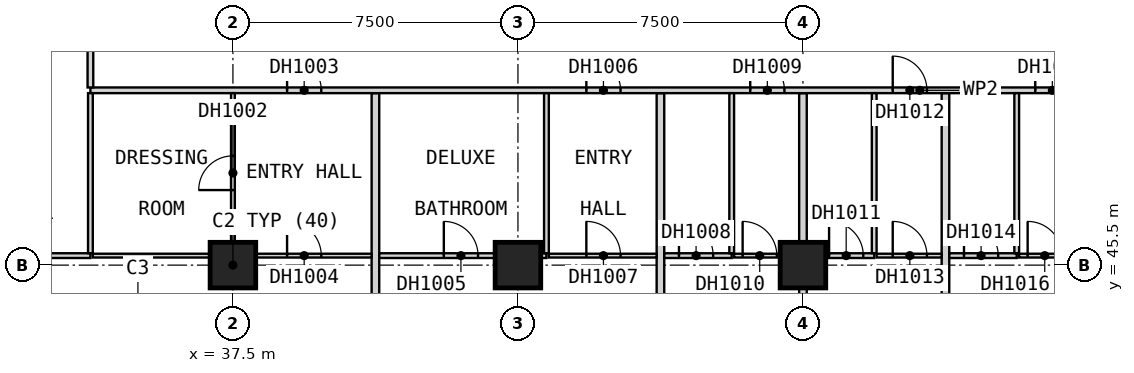
"""IFC4 building model, lengths in metres.
Left out: names, types, materials, properties, quantities, classifications, styles, units other than length and angle.
Written with IfcOpenShell. Run it as: python <this file> out.ifc"""

import sys

from ifc_helpers import new_model, si_unit, direction, frame, frame_2d, origin, origin_2d, place, context, subcontext, project, spatial, rectangle, extrude, element, fill, save


model = new_model("IFC4")
c1 = context("Model", 3, precision=1e-05, world=origin(), true_north=direction((0.0, 1.0)))
c2 = subcontext(c1, "Body", "Model", "MODEL_VIEW")
j1 = project(units=[si_unit("LENGTHUNIT", "METRE"), si_unit("PLANEANGLEUNIT", "RADIAN")], contexts=[c1])
p1 = place(None, origin())
s1 = spatial("IfcSite", under=j1, at=p1, CompositionType="ELEMENT")
p2 = place(p1, origin())
s2 = spatial("IfcBuilding", under=s1, at=p2, CompositionType="ELEMENT")
p3 = place(p2, frame((0.0, 0.0, 48.4)))
s3 = spatial("IfcBuildingStorey", under=s2, at=p3, CompositionType="ELEMENT", Elevation=48.4)
for number, where, z_axis, x_axis in (
    (1, (37.5, 45.5, 0.0), (0.0, 0.0, 1.0), (1.0, 0.0, 0.0)),
    (2, (45.0, 45.5, 0.0), (0.0, 0.0, 1.0), (1.0, 0.0, 0.0)),
    (3, (52.5, 45.5, 0.0), (0.0, 0.0, 1.0), (1.0, 0.0, 0.0)),
):
    element("IfcColumn", number, at=place(p3, frame(where, z_axis=z_axis, x_axis=x_axis)), inside=s3, PredefinedType="COLUMN", context=c2, shape_type="SweptSolid", body=[
        extrude(rectangle(XDim=1.2, YDim=1.2, at=origin_2d()), origin(), (0.0, 0.0, 1.0), 3.6),
    ])
for number, where, z_axis, x_axis in (
    (4, (41.25, 38.31, 0.0), (0.0, 0.0, 1.0), (0.0, 1.0, 0.0)),
    (5, (48.75, 38.31, 0.0), (0.0, 0.0, 1.0), (0.0, 1.0, 0.0)),
):
    element("IfcWall", number, at=place(p3, frame(where, z_axis=z_axis, x_axis=x_axis)), inside=s3, PredefinedType="PARTITIONING", context=c2, shape_type="SweptSolid", body=[
        extrude(rectangle(XDim=11.715, YDim=0.2, at=frame_2d((5.857, 0.0))), origin(), (0.0, 0.0, 1.0), 3.35),
    ])
p4 = place(p3, frame((52.5, 37.5, 0.0), z_axis=(0.0, 0.0, 1.0), x_axis=(0.0, 1.0, 0.0)))
e6 = element("IfcWall", 6, at=p4, inside=s3, PredefinedType="PARTITIONING", context=c2, shape_type="SweptSolid", body=[
    extrude(rectangle(XDim=12.525, YDim=0.2, at=frame_2d((6.262, 0.0))), origin(), (0.0, 0.0, 1.0), 3.35),
])
p5 = place(p3, frame((56.25, 38.31, 0.0), z_axis=(0.0, 0.0, 1.0), x_axis=(0.0, 1.0, 0.0)))
e7 = element("IfcWall", 7, at=p5, inside=s3, PredefinedType="PARTITIONING", context=c2, shape_type="SweptSolid", body=[
    extrude(rectangle(XDim=11.715, YDim=0.2, at=frame_2d((5.857, 0.0))), origin(), (0.0, 0.0, 1.0), 3.35),
])
p6 = place(p3, frame((33.75, 50.1, 0.0), z_axis=(0.0, 0.0, 1.0), x_axis=(1.0, 0.0, 0.0)))
e8 = element("IfcWall", 8, at=p6, inside=s3, PredefinedType="PARTITIONING", context=c2, shape_type="SweptSolid", body=[
    extrude(rectangle(XDim=43.65, YDim=0.15, at=frame_2d((21.825, 0.0))), origin(), (0.0, 0.0, 1.0), 3.35),
])
p7 = place(p6, frame((5.175, 0.0, 0.0)))
e9 = element("IfcOpeningElement", 9, at=p7, cuts=e8, PredefinedType="OPENING", context=c2, shape_type="SweptSolid", body=[
    extrude(rectangle(XDim=0.9, YDim=2.1, at=frame_2d((0.45, 1.05))), frame((0.0, 0.085, 0.0), z_axis=(0.0, -1.0, 0.0), x_axis=(1.0, 0.0, 0.0)), (0.0, 0.0, 1.0), 0.17),
])
p8 = place(p6, frame((13.05, 0.0, 0.0)))
e10 = element("IfcOpeningElement", 10, at=p8, cuts=e8, PredefinedType="OPENING", context=c2, shape_type="SweptSolid", body=[
    extrude(rectangle(XDim=0.9, YDim=2.1, at=frame_2d((0.45, 1.05))), frame((0.0, 0.085, 0.0), z_axis=(0.0, -1.0, 0.0), x_axis=(1.0, 0.0, 0.0)), (0.0, 0.0, 1.0), 0.17),
])
p9 = place(p6, frame((17.363, 0.0, 0.0)))
e11 = element("IfcOpeningElement", 11, at=p9, cuts=e8, PredefinedType="OPENING", context=c2, shape_type="SweptSolid", body=[
    extrude(rectangle(XDim=0.9, YDim=2.1, at=frame_2d((0.45, 1.05))), frame((0.0, 0.085, 0.0), z_axis=(0.0, -1.0, 0.0), x_axis=(1.0, 0.0, 0.0)), (0.0, 0.0, 1.0), 0.17),
])
p10 = place(p6, frame((21.113, 0.0, 0.0)))
e12 = element("IfcOpeningElement", 12, at=p10, cuts=e8, PredefinedType="OPENING", context=c2, shape_type="SweptSolid", body=[
    extrude(rectangle(XDim=0.9, YDim=2.1, at=frame_2d((0.45, 1.05))), frame((0.0, 0.085, 0.0), z_axis=(0.0, -1.0, 0.0), x_axis=(1.0, 0.0, 0.0)), (0.0, 0.0, 1.0), 0.17),
])
p11 = place(p6, frame((24.863, 0.0, 0.0)))
e13 = element("IfcOpeningElement", 13, at=p11, cuts=e8, PredefinedType="OPENING", context=c2, shape_type="SweptSolid", body=[
    extrude(rectangle(XDim=0.9, YDim=2.1, at=frame_2d((0.45, 1.05))), frame((0.0, 0.085, 0.0), z_axis=(0.0, -1.0, 0.0), x_axis=(1.0, 0.0, 0.0)), (0.0, 0.0, 1.0), 0.17),
])
p12 = place(p6, frame((28.613, 0.0, 0.0)))
e14 = element("IfcOpeningElement", 14, at=p12, cuts=e8, PredefinedType="OPENING", context=c2, shape_type="SweptSolid", body=[
    extrude(rectangle(XDim=0.9, YDim=2.1, at=frame_2d((0.45, 1.05))), frame((0.0, 0.085, 0.0), z_axis=(0.0, -1.0, 0.0), x_axis=(1.0, 0.0, 0.0)), (0.0, 0.0, 1.0), 0.17),
])
p13 = place(p6, frame((32.363, 0.0, 0.0)))
e15 = element("IfcOpeningElement", 15, at=p13, cuts=e8, PredefinedType="OPENING", context=c2, shape_type="SweptSolid", body=[
    extrude(rectangle(XDim=0.9, YDim=2.1, at=frame_2d((0.45, 1.05))), frame((0.0, 0.085, 0.0), z_axis=(0.0, -1.0, 0.0), x_axis=(1.0, 0.0, 0.0)), (0.0, 0.0, 1.0), 0.17),
])
p14 = place(p6, frame((39.3, 0.0, 0.0)))
e16 = element("IfcOpeningElement", 16, at=p14, cuts=e8, PredefinedType="OPENING", context=c2, shape_type="SweptSolid", body=[
    extrude(rectangle(XDim=0.9, YDim=2.1, at=frame_2d((0.45, 1.05))), frame((0.0, 0.085, 0.0), z_axis=(0.0, -1.0, 0.0), x_axis=(1.0, 0.0, 0.0)), (0.0, 0.0, 1.0), 0.17),
])
p15 = place(p6, frame((42.0, 0.0, 0.0)))
e17 = element("IfcOpeningElement", 17, at=p15, cuts=e8, PredefinedType="OPENING", context=c2, shape_type="SweptSolid", body=[
    extrude(rectangle(XDim=0.9, YDim=2.1, at=frame_2d((0.45, 1.05))), frame((0.0, 0.085, 0.0), z_axis=(0.0, -1.0, 0.0), x_axis=(1.0, 0.0, 0.0)), (0.0, 0.0, 1.0), 0.17),
])
p16 = place(p3, frame((33.75, 50.175, 0.0), z_axis=(0.0, 0.0, 1.0), x_axis=(0.0, 1.0, 0.0)))
e18 = element("IfcWall", 18, at=p16, inside=s3, PredefinedType="PARTITIONING", context=c2, shape_type="SweptSolid", body=[
    extrude(rectangle(XDim=2.225, YDim=0.15, at=frame_2d((1.112, 0.0))), origin(), (0.0, 0.0, 1.0), 3.35),
])
p17 = place(p3, frame((33.812, 45.75, 0.0), z_axis=(0.0, 0.0, 1.0), x_axis=(1.0, 0.0, 0.0)))
e19 = element("IfcWall", 19, at=p17, inside=s3, PredefinedType="PARTITIONING", context=c2, shape_type="SweptSolid", body=[
    extrude(rectangle(XDim=7.337, YDim=0.1, at=frame_2d((3.669, 0.0))), origin(), (0.0, 0.0, 1.0), 3.35),
])
p18 = place(p17, frame((5.113, 0.0, 0.0)))
e20 = element("IfcOpeningElement", 20, at=p18, cuts=e19, PredefinedType="OPENING", context=c2, shape_type="SweptSolid", body=[
    extrude(rectangle(XDim=0.9, YDim=2.1, at=frame_2d((0.45, 1.05))), frame((0.0, 0.06, 0.0), z_axis=(0.0, -1.0, 0.0), x_axis=(1.0, 0.0, 0.0)), (0.0, 0.0, 1.0), 0.12),
])
p19 = place(p3, frame((45.812, 45.75, 0.0), z_axis=(0.0, 0.0, 1.0), x_axis=(1.0, 0.0, 0.0)))
e21 = element("IfcWall", 21, at=p19, inside=s3, PredefinedType="PARTITIONING", context=c2, shape_type="SweptSolid", body=[
    extrude(rectangle(XDim=2.837, YDim=0.1, at=frame_2d((1.419, 0.0))), origin(), (0.0, 0.0, 1.0), 3.35),
])
p20 = place(p19, frame((0.988, 0.0, 0.0)))
e22 = element("IfcOpeningElement", 22, at=p20, cuts=e21, PredefinedType="OPENING", context=c2, shape_type="SweptSolid", body=[
    extrude(rectangle(XDim=0.9, YDim=2.1, at=frame_2d((0.45, 1.05))), frame((0.0, 0.06, 0.0), z_axis=(0.0, -1.0, 0.0), x_axis=(1.0, 0.0, 0.0)), (0.0, 0.0, 1.0), 0.12),
])
p21 = place(p3, frame((50.688, 45.75, 0.0), z_axis=(0.0, 0.0, 1.0), x_axis=(1.0, 0.0, 0.0)))
e23 = element("IfcWall", 23, at=p21, inside=s3, PredefinedType="PARTITIONING", context=c2, shape_type="SweptSolid", body=[
    extrude(rectangle(XDim=1.712, YDim=0.1, at=frame_2d((0.856, 0.0))), origin(), (0.0, 0.0, 1.0), 3.35),
])
p22 = place(p21, frame((0.225, 0.0, 0.0)))
e24 = element("IfcOpeningElement", 24, at=p22, cuts=e23, PredefinedType="OPENING", context=c2, shape_type="SweptSolid", body=[
    extrude(rectangle(XDim=0.9, YDim=2.1, at=frame_2d((0.45, 1.05))), frame((0.0, 0.06, 0.0), z_axis=(0.0, -1.0, 0.0), x_axis=(1.0, 0.0, 0.0)), (0.0, 0.0, 1.0), 0.12),
])
p23 = place(p3, frame((54.438, 45.75, 0.0), z_axis=(0.0, 0.0, 1.0), x_axis=(1.0, 0.0, 0.0)))
e25 = element("IfcWall", 25, at=p23, inside=s3, PredefinedType="PARTITIONING", context=c2, shape_type="SweptSolid", body=[
    extrude(rectangle(XDim=1.712, YDim=0.1, at=frame_2d((0.856, 0.0))), origin(), (0.0, 0.0, 1.0), 3.35),
])
p24 = place(p23, frame((0.425, 0.0, 0.0)))
e26 = element("IfcOpeningElement", 26, at=p24, cuts=e25, PredefinedType="OPENING", context=c2, shape_type="SweptSolid", body=[
    extrude(rectangle(XDim=0.9, YDim=2.1, at=frame_2d((0.45, 1.05))), frame((0.0, 0.06, 0.0), z_axis=(0.0, -1.0, 0.0), x_axis=(1.0, 0.0, 0.0)), (0.0, 0.0, 1.0), 0.12),
])
p25 = place(p3, frame((58.188, 45.75, 0.0), z_axis=(0.0, 0.0, 1.0), x_axis=(1.0, 0.0, 0.0)))
e27 = element("IfcWall", 27, at=p25, inside=s3, PredefinedType="PARTITIONING", context=c2, shape_type="SweptSolid", body=[
    extrude(rectangle(XDim=1.712, YDim=0.1, at=frame_2d((0.856, 0.0))), origin(), (0.0, 0.0, 1.0), 3.35),
])
p26 = place(p25, frame((0.225, 0.0, 0.0)))
e28 = element("IfcOpeningElement", 28, at=p26, cuts=e27, PredefinedType="OPENING", context=c2, shape_type="SweptSolid", body=[
    extrude(rectangle(XDim=0.9, YDim=2.1, at=frame_2d((0.45, 1.05))), frame((0.0, 0.06, 0.0), z_axis=(0.0, -1.0, 0.0), x_axis=(1.0, 0.0, 0.0)), (0.0, 0.0, 1.0), 0.12),
])
p27 = place(p3, frame((37.5, 45.8, 0.0), z_axis=(0.0, 0.0, 1.0), x_axis=(0.0, 1.0, 0.0)))
e29 = element("IfcWall", 29, at=p27, inside=s3, PredefinedType="PARTITIONING", context=c2, shape_type="SweptSolid", body=[
    extrude(rectangle(XDim=4.225, YDim=0.1, at=frame_2d((2.112, 0.0))), origin(), (0.0, 0.0, 1.0), 3.35),
])
p28 = place(p27, frame((1.675, 0.0, 0.0)))
e30 = element("IfcOpeningElement", 30, at=p28, cuts=e29, PredefinedType="OPENING", context=c2, shape_type="SweptSolid", body=[
    extrude(rectangle(XDim=0.9, YDim=2.1, at=frame_2d((0.45, 1.05))), frame((0.0, 0.06, 0.0), z_axis=(0.0, -1.0, 0.0), x_axis=(1.0, 0.0, 0.0)), (0.0, 0.0, 1.0), 0.12),
])
p29 = place(p3, frame((30.0, 45.75, 0.0), z_axis=(0.0, 0.0, 1.0), x_axis=(1.0, 0.0, 0.0)))
e31 = element("IfcWall", 31, at=p29, inside=s3, PredefinedType="PARTITIONING", context=c2, shape_type="SweptSolid", body=[
    extrude(rectangle(XDim=3.75, YDim=0.125, at=frame_2d((1.875, 0.0))), origin(), (0.0, 0.0, 1.0), 3.35),
])
p30 = place(p29, frame((1.425, 0.0, 0.0)))
e32 = element("IfcOpeningElement", 32, at=p30, cuts=e31, PredefinedType="OPENING", context=c2, shape_type="SweptSolid", body=[
    extrude(rectangle(XDim=0.9, YDim=2.1, at=frame_2d((0.45, 1.05))), frame((0.0, 0.073, 0.0), z_axis=(0.0, -1.0, 0.0), x_axis=(1.0, 0.0, 0.0)), (0.0, 0.0, 1.0), 0.145),
])
p31 = place(p3, frame((41.35, 45.75, 0.0), z_axis=(0.0, 0.0, 1.0), x_axis=(1.0, 0.0, 0.0)))
e33 = element("IfcWall", 33, at=p31, inside=s3, PredefinedType="PARTITIONING", context=c2, shape_type="SweptSolid", body=[
    extrude(rectangle(XDim=4.4, YDim=0.125, at=frame_2d((2.2, 0.0))), origin(), (0.0, 0.0, 1.0), 3.35),
])
p32 = place(p31, frame((1.7, 0.0, 0.0)))
e34 = element("IfcOpeningElement", 34, at=p32, cuts=e33, PredefinedType="OPENING", context=c2, shape_type="SweptSolid", body=[
    extrude(rectangle(XDim=0.9, YDim=2.1, at=frame_2d((0.45, 1.05))), frame((0.0, 0.073, 0.0), z_axis=(0.0, -1.0, 0.0), x_axis=(1.0, 0.0, 0.0)), (0.0, 0.0, 1.0), 0.145),
])
p33 = place(p3, frame((48.85, 45.75, 0.0), z_axis=(0.0, 0.0, 1.0), x_axis=(1.0, 0.0, 0.0)))
e35 = element("IfcWall", 35, at=p33, inside=s3, PredefinedType="PARTITIONING", context=c2, shape_type="SweptSolid", body=[
    extrude(rectangle(XDim=1.775, YDim=0.125, at=frame_2d((0.887, 0.0))), origin(), (0.0, 0.0, 1.0), 3.35),
])
p34 = place(p33, frame((0.387, 0.0, 0.0)))
e36 = element("IfcOpeningElement", 36, at=p34, cuts=e35, PredefinedType="OPENING", context=c2, shape_type="SweptSolid", body=[
    extrude(rectangle(XDim=0.9, YDim=2.1, at=frame_2d((0.45, 1.05))), frame((0.0, 0.073, 0.0), z_axis=(0.0, -1.0, 0.0), x_axis=(1.0, 0.0, 0.0)), (0.0, 0.0, 1.0), 0.145),
])
p35 = place(p3, frame((52.6, 45.75, 0.0), z_axis=(0.0, 0.0, 1.0), x_axis=(1.0, 0.0, 0.0)))
e37 = element("IfcWall", 37, at=p35, inside=s3, PredefinedType="PARTITIONING", context=c2, shape_type="SweptSolid", body=[
    extrude(rectangle(XDim=1.775, YDim=0.125, at=frame_2d((0.887, 0.0))), origin(), (0.0, 0.0, 1.0), 3.35),
])
p36 = place(p35, frame((0.587, 0.0, 0.0)))
e38 = element("IfcOpeningElement", 38, at=p36, cuts=e37, PredefinedType="OPENING", context=c2, shape_type="SweptSolid", body=[
    extrude(rectangle(XDim=0.9, YDim=2.1, at=frame_2d((0.45, 1.05))), frame((0.0, 0.073, 0.0), z_axis=(0.0, -1.0, 0.0), x_axis=(1.0, 0.0, 0.0)), (0.0, 0.0, 1.0), 0.145),
])
p37 = place(p3, frame((56.35, 45.75, 0.0), z_axis=(0.0, 0.0, 1.0), x_axis=(1.0, 0.0, 0.0)))
e39 = element("IfcWall", 39, at=p37, inside=s3, PredefinedType="PARTITIONING", context=c2, shape_type="SweptSolid", body=[
    extrude(rectangle(XDim=1.775, YDim=0.125, at=frame_2d((0.887, 0.0))), origin(), (0.0, 0.0, 1.0), 3.35),
])
p38 = place(p37, frame((0.387, 0.0, 0.0)))
e40 = element("IfcOpeningElement", 40, at=p38, cuts=e39, PredefinedType="OPENING", context=c2, shape_type="SweptSolid", body=[
    extrude(rectangle(XDim=0.9, YDim=2.1, at=frame_2d((0.45, 1.05))), frame((0.0, 0.073, 0.0), z_axis=(0.0, -1.0, 0.0), x_axis=(1.0, 0.0, 0.0)), (0.0, 0.0, 1.0), 0.145),
])
for number, where, z_axis, x_axis in (
    (41, (33.75, 45.812, 0.0), (0.0, 0.0, 1.0), (0.0, 1.0, 0.0)),
    (42, (45.75, 45.812, 0.0), (0.0, 0.0, 1.0), (0.0, 1.0, 0.0)),
    (43, (50.625, 45.812, 0.0), (0.0, 0.0, 1.0), (0.0, 1.0, 0.0)),
    (44, (54.375, 45.812, 0.0), (0.0, 0.0, 1.0), (0.0, 1.0, 0.0)),
    (45, (58.125, 45.812, 0.0), (0.0, 0.0, 1.0), (0.0, 1.0, 0.0)),
):
    element("IfcWall", number, at=place(p3, frame(where, z_axis=z_axis, x_axis=x_axis)), inside=s3, PredefinedType="PARTITIONING", context=c2, shape_type="SweptSolid", body=[
        extrude(rectangle(XDim=4.212, YDim=0.125, at=frame_2d((2.106, 0.0))), origin(), (0.0, 0.0, 1.0), 3.35),
    ])
p39 = place(p28, origin())
e46 = element("IfcDoor", 46, at=p39, inside=s3, OperationType="SINGLE_SWING_RIGHT", PredefinedType="DOOR", context=c2, shape_type="SweptSolid", body=[
    extrude(rectangle(XDim=0.9, YDim=2.1, at=frame_2d((0.45, 1.05))), frame((0.0, 0.025, 0.0), z_axis=(0.0, -1.0, 0.0), x_axis=(1.0, 0.0, 0.0)), (0.0, 0.0, 1.0), 0.05),
])
fill(e30, e46)
p40 = place(p7, origin())
e47 = element("IfcDoor", 47, at=p40, inside=s3, OperationType="SINGLE_SWING_RIGHT", PredefinedType="DOOR", context=c2, shape_type="SweptSolid", body=[
    extrude(rectangle(XDim=0.9, YDim=2.1, at=frame_2d((0.45, 1.05))), frame((0.0, 0.025, 0.0), z_axis=(0.0, -1.0, 0.0), x_axis=(1.0, 0.0, 0.0)), (0.0, 0.0, 1.0), 0.05),
])
fill(e9, e47)
p41 = place(p18, origin())
e48 = element("IfcDoor", 48, at=p41, inside=s3, OperationType="SINGLE_SWING_LEFT", PredefinedType="DOOR", context=c2, shape_type="SweptSolid", body=[
    extrude(rectangle(XDim=0.9, YDim=2.1, at=frame_2d((0.45, 1.05))), frame((0.0, 0.025, 0.0), z_axis=(0.0, -1.0, 0.0), x_axis=(1.0, 0.0, 0.0)), (0.0, 0.0, 1.0), 0.05),
])
fill(e20, e48)
p42 = place(p32, origin())
e49 = element("IfcDoor", 49, at=p42, inside=s3, OperationType="SINGLE_SWING_LEFT", PredefinedType="DOOR", context=c2, shape_type="SweptSolid", body=[
    extrude(rectangle(XDim=0.9, YDim=2.1, at=frame_2d((0.45, 1.05))), frame((0.0, 0.025, 0.0), z_axis=(0.0, -1.0, 0.0), x_axis=(1.0, 0.0, 0.0)), (0.0, 0.0, 1.0), 0.05),
])
fill(e34, e49)
p43 = place(p8, origin())
e50 = element("IfcDoor", 50, at=p43, inside=s3, OperationType="SINGLE_SWING_RIGHT", PredefinedType="DOOR", context=c2, shape_type="SweptSolid", body=[
    extrude(rectangle(XDim=0.9, YDim=2.1, at=frame_2d((0.45, 1.05))), frame((0.0, 0.025, 0.0), z_axis=(0.0, -1.0, 0.0), x_axis=(1.0, 0.0, 0.0)), (0.0, 0.0, 1.0), 0.05),
])
fill(e10, e50)
p44 = place(p20, origin())
e51 = element("IfcDoor", 51, at=p44, inside=s3, OperationType="SINGLE_SWING_LEFT", PredefinedType="DOOR", context=c2, shape_type="SweptSolid", body=[
    extrude(rectangle(XDim=0.9, YDim=2.1, at=frame_2d((0.45, 1.05))), frame((0.0, 0.025, 0.0), z_axis=(0.0, -1.0, 0.0), x_axis=(1.0, 0.0, 0.0)), (0.0, 0.0, 1.0), 0.05),
])
fill(e22, e51)
p45 = place(p34, origin())
e52 = element("IfcDoor", 52, at=p45, inside=s3, OperationType="SINGLE_SWING_LEFT", PredefinedType="DOOR", context=c2, shape_type="SweptSolid", body=[
    extrude(rectangle(XDim=0.9, YDim=2.1, at=frame_2d((0.45, 1.05))), frame((0.0, 0.025, 0.0), z_axis=(0.0, -1.0, 0.0), x_axis=(1.0, 0.0, 0.0)), (0.0, 0.0, 1.0), 0.05),
])
fill(e36, e52)
p46 = place(p9, origin())
e53 = element("IfcDoor", 53, at=p46, inside=s3, OperationType="SINGLE_SWING_RIGHT", PredefinedType="DOOR", context=c2, shape_type="SweptSolid", body=[
    extrude(rectangle(XDim=0.9, YDim=2.1, at=frame_2d((0.45, 1.05))), frame((0.0, 0.025, 0.0), z_axis=(0.0, -1.0, 0.0), x_axis=(1.0, 0.0, 0.0)), (0.0, 0.0, 1.0), 0.05),
])
fill(e11, e53)
p47 = place(p22, origin())
e54 = element("IfcDoor", 54, at=p47, inside=s3, OperationType="SINGLE_SWING_LEFT", PredefinedType="DOOR", context=c2, shape_type="SweptSolid", body=[
    extrude(rectangle(XDim=0.9, YDim=2.1, at=frame_2d((0.45, 1.05))), frame((0.0, 0.025, 0.0), z_axis=(0.0, -1.0, 0.0), x_axis=(1.0, 0.0, 0.0)), (0.0, 0.0, 1.0), 0.05),
])
fill(e24, e54)
p48 = place(p36, origin())
e55 = element("IfcDoor", 55, at=p48, inside=s3, OperationType="SINGLE_SWING_RIGHT", PredefinedType="DOOR", context=c2, shape_type="SweptSolid", body=[
    extrude(rectangle(XDim=0.9, YDim=2.1, at=frame_2d((0.45, 1.05))), frame((0.0, 0.025, 0.0), z_axis=(0.0, -1.0, 0.0), x_axis=(1.0, 0.0, 0.0)), (0.0, 0.0, 1.0), 0.05),
])
fill(e38, e55)
p49 = place(p10, origin())
e56 = element("IfcDoor", 56, at=p49, inside=s3, OperationType="SINGLE_SWING_RIGHT", PredefinedType="DOOR", context=c2, shape_type="SweptSolid", body=[
    extrude(rectangle(XDim=0.9, YDim=2.1, at=frame_2d((0.45, 1.05))), frame((0.0, 0.025, 0.0), z_axis=(0.0, -1.0, 0.0), x_axis=(1.0, 0.0, 0.0)), (0.0, 0.0, 1.0), 0.05),
])
fill(e12, e56)
p50 = place(p24, origin())
e57 = element("IfcDoor", 57, at=p50, inside=s3, OperationType="SINGLE_SWING_LEFT", PredefinedType="DOOR", context=c2, shape_type="SweptSolid", body=[
    extrude(rectangle(XDim=0.9, YDim=2.1, at=frame_2d((0.45, 1.05))), frame((0.0, 0.025, 0.0), z_axis=(0.0, -1.0, 0.0), x_axis=(1.0, 0.0, 0.0)), (0.0, 0.0, 1.0), 0.05),
])
fill(e26, e57)
p51 = place(p38, origin())
e58 = element("IfcDoor", 58, at=p51, inside=s3, OperationType="SINGLE_SWING_LEFT", PredefinedType="DOOR", context=c2, shape_type="SweptSolid", body=[
    extrude(rectangle(XDim=0.9, YDim=2.1, at=frame_2d((0.45, 1.05))), frame((0.0, 0.025, 0.0), z_axis=(0.0, -1.0, 0.0), x_axis=(1.0, 0.0, 0.0)), (0.0, 0.0, 1.0), 0.05),
])
fill(e40, e58)
p52 = place(p11, origin())
e59 = element("IfcDoor", 59, at=p52, inside=s3, OperationType="SINGLE_SWING_RIGHT", PredefinedType="DOOR", context=c2, shape_type="SweptSolid", body=[
    extrude(rectangle(XDim=0.9, YDim=2.1, at=frame_2d((0.45, 1.05))), frame((0.0, 0.025, 0.0), z_axis=(0.0, -1.0, 0.0), x_axis=(1.0, 0.0, 0.0)), (0.0, 0.0, 1.0), 0.05),
])
fill(e13, e59)
p53 = place(p26, origin())
e60 = element("IfcDoor", 60, at=p53, inside=s3, OperationType="SINGLE_SWING_LEFT", PredefinedType="DOOR", context=c2, shape_type="SweptSolid", body=[
    extrude(rectangle(XDim=0.9, YDim=2.1, at=frame_2d((0.45, 1.05))), frame((0.0, 0.025, 0.0), z_axis=(0.0, -1.0, 0.0), x_axis=(1.0, 0.0, 0.0)), (0.0, 0.0, 1.0), 0.05),
])
fill(e28, e60)
save(model, sys.argv[1])
